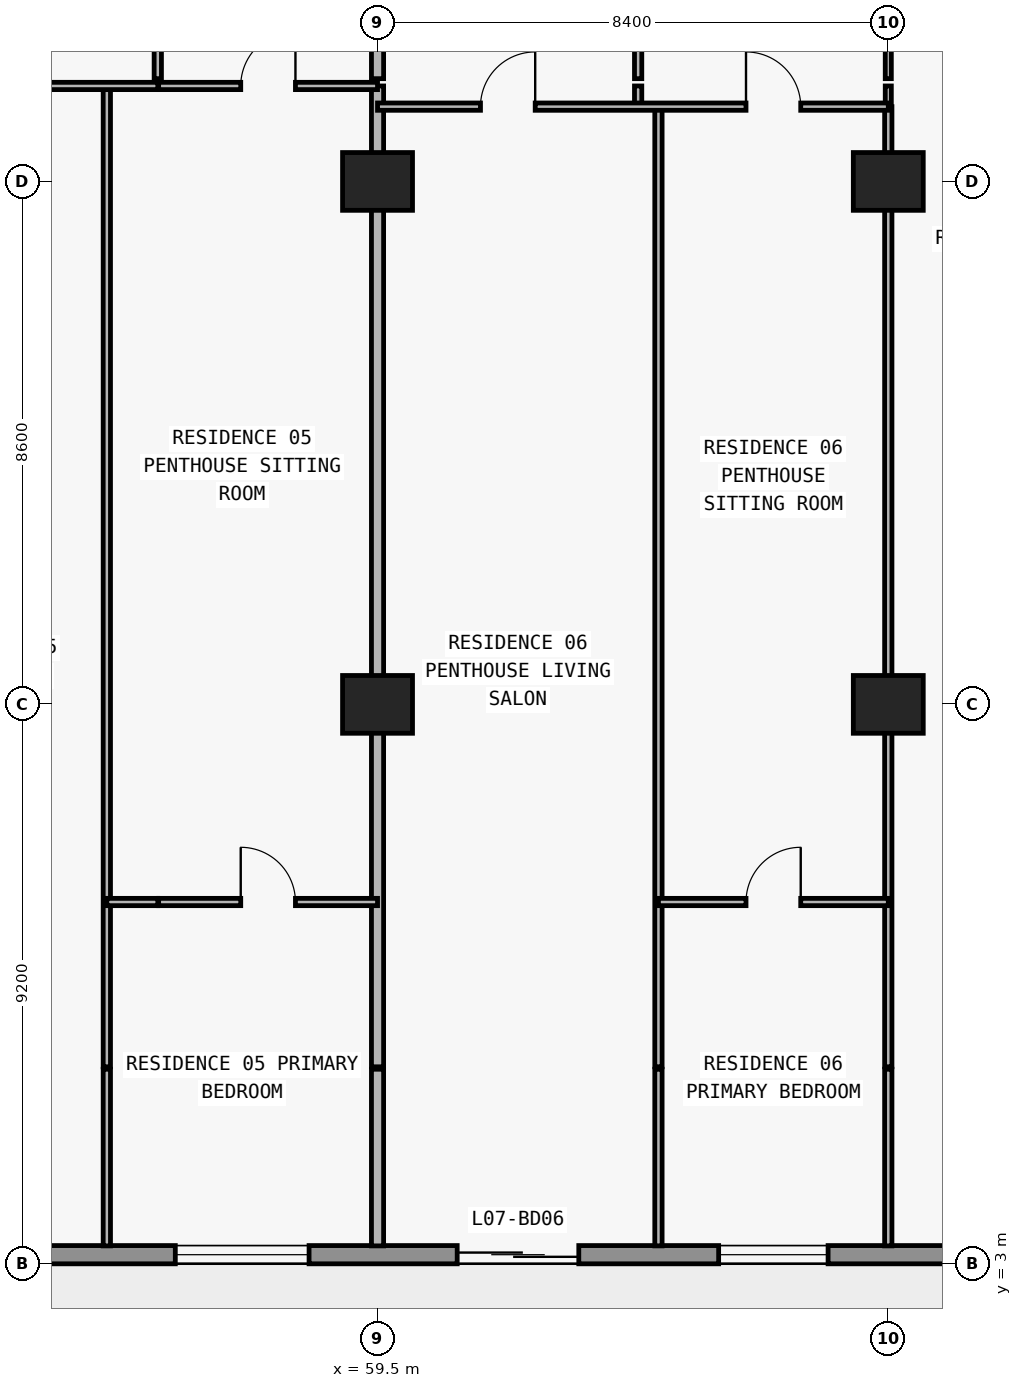
"""IFC4 building model, lengths in metres.
Left out: names, types, materials, properties, quantities, classifications, styles, units other than length and angle.
Written with IfcOpenShell. Run it as: python <this file> out.ifc"""

import sys

from ifc_helpers import new_model, si_unit, direction, frame, frame_2d, origin, origin_2d, place, context, subcontext, project, spatial, rectangle, extrude, element, fill, save


model = new_model("IFC4")
c1 = context("Model", 3, precision=1e-05, world=origin(), true_north=direction((0.0, 1.0)))
c2 = subcontext(c1, "Body", "Model", "MODEL_VIEW")
j1 = project(units=[si_unit("LENGTHUNIT", "METRE"), si_unit("PLANEANGLEUNIT", "RADIAN")], contexts=[c1])
p1 = place(None, origin())
s1 = spatial("IfcSite", under=j1, at=p1, CompositionType="ELEMENT")
p2 = place(p1, origin())
s2 = spatial("IfcBuilding", under=s1, at=p2, CompositionType="ELEMENT")
p3 = place(p2, frame((0.0, 0.0, 33.3)))
s3 = spatial("IfcBuildingStorey", under=s2, at=p3, CompositionType="ELEMENT", Elevation=33.3)
for number, where, z_axis, x_axis in (
    (1, (59.5, 12.2, 0.0), (0.0, 0.0, 1.0), (1.0, 0.0, 0.0)),
    (2, (67.9, 12.2, 0.0), (0.0, 0.0, 1.0), (1.0, 0.0, 0.0)),
    (3, (59.5, 20.8, 0.0), (0.0, 0.0, 1.0), (1.0, 0.0, 0.0)),
    (4, (67.9, 20.8, 0.0), (0.0, 0.0, 1.0), (1.0, 0.0, 0.0)),
):
    element("IfcColumn", number, at=place(p3, frame(where, z_axis=z_axis, x_axis=x_axis)), inside=s3, PredefinedType="COLUMN", context=c2, shape_type="SweptSolid", body=[
        extrude(rectangle(XDim=1.15, YDim=0.95, at=origin_2d()), origin(), (0.0, 0.0, 1.0), 3.05),
    ])
p4 = place(p3, frame((72.7, 3.15, 0.0), z_axis=(0.0, 0.0, 1.0), x_axis=(-1.0, 0.0, 0.0)))
e5 = element("IfcWall", 5, at=p4, inside=s3, PredefinedType="STANDARD", context=c2, shape_type="SweptSolid", body=[
    extrude(rectangle(XDim=67.6, YDim=0.3, at=frame_2d((33.8, 0.0))), origin(), (0.0, 0.0, 1.0), 3.05),
])
p5 = place(p4, frame((59.826, 0.0, 0.0)))
e6 = element("IfcOpeningElement", 6, at=p5, cuts=e5, PredefinedType="OPENING", context=c2, shape_type="SweptSolid", body=[
    extrude(rectangle(XDim=2.0, YDim=2.3, at=frame_2d((1.0, 1.15))), frame((0.0, 0.16, 0.0), z_axis=(0.0, -1.0, 0.0), x_axis=(1.0, 0.0, 0.0)), (0.0, 0.0, 1.0), 0.32),
])
p6 = place(p4, frame((55.526, 0.0, 0.85)))
e7 = element("IfcOpeningElement", 7, at=p6, cuts=e5, PredefinedType="OPENING", context=c2, shape_type="SweptSolid", body=[
    extrude(rectangle(XDim=2.2, YDim=1.55, at=frame_2d((1.1, 0.775))), frame((0.0, 0.16, 0.0), z_axis=(0.0, -1.0, 0.0), x_axis=(1.0, 0.0, 0.0)), (0.0, 0.0, 1.0), 0.32),
])
p7 = place(p4, frame((51.09, 0.0, 0.0)))
e8 = element("IfcOpeningElement", 8, at=p7, cuts=e5, PredefinedType="OPENING", context=c2, shape_type="SweptSolid", body=[
    extrude(rectangle(XDim=2.0, YDim=2.3, at=frame_2d((1.0, 1.15))), frame((0.0, 0.16, 0.0), z_axis=(0.0, -1.0, 0.0), x_axis=(1.0, 0.0, 0.0)), (0.0, 0.0, 1.0), 0.32),
])
p8 = place(p4, frame((46.99, 0.0, 0.85)))
e9 = element("IfcOpeningElement", 9, at=p8, cuts=e5, PredefinedType="OPENING", context=c2, shape_type="SweptSolid", body=[
    extrude(rectangle(XDim=1.8, YDim=1.55, at=frame_2d((0.9, 0.775))), frame((0.0, 0.16, 0.0), z_axis=(0.0, -1.0, 0.0), x_axis=(1.0, 0.0, 0.0)), (0.0, 0.0, 1.0), 0.32),
])
p9 = place(p4, frame((43.026, 0.0, 0.0)))
e10 = element("IfcOpeningElement", 10, at=p9, cuts=e5, PredefinedType="OPENING", context=c2, shape_type="SweptSolid", body=[
    extrude(rectangle(XDim=2.0, YDim=2.3, at=frame_2d((1.0, 1.15))), frame((0.0, 0.16, 0.0), z_axis=(0.0, -1.0, 0.0), x_axis=(1.0, 0.0, 0.0)), (0.0, 0.0, 1.0), 0.32),
])
p10 = place(p4, frame((38.726, 0.0, 0.85)))
e11 = element("IfcOpeningElement", 11, at=p10, cuts=e5, PredefinedType="OPENING", context=c2, shape_type="SweptSolid", body=[
    extrude(rectangle(XDim=2.2, YDim=1.55, at=frame_2d((1.1, 0.775))), frame((0.0, 0.16, 0.0), z_axis=(0.0, -1.0, 0.0), x_axis=(1.0, 0.0, 0.0)), (0.0, 0.0, 1.0), 0.32),
])
p11 = place(p4, frame((34.69, 0.0, 0.0)))
e12 = element("IfcOpeningElement", 12, at=p11, cuts=e5, PredefinedType="OPENING", context=c2, shape_type="SweptSolid", body=[
    extrude(rectangle(XDim=2.0, YDim=2.3, at=frame_2d((1.0, 1.15))), frame((0.0, 0.16, 0.0), z_axis=(0.0, -1.0, 0.0), x_axis=(1.0, 0.0, 0.0)), (0.0, 0.0, 1.0), 0.32),
])
p12 = place(p4, frame((30.81, 0.0, 0.65)))
e13 = element("IfcOpeningElement", 13, at=p12, cuts=e5, PredefinedType="OPENING", context=c2, shape_type="SweptSolid", body=[
    extrude(rectangle(XDim=2.6, YDim=1.85, at=frame_2d((1.3, 0.925))), frame((0.0, 0.16, 0.0), z_axis=(0.0, -1.0, 0.0), x_axis=(1.0, 0.0, 0.0)), (0.0, 0.0, 1.0), 0.32),
])
p13 = place(p4, frame((24.7, 0.0, 0.85)))
e14 = element("IfcOpeningElement", 14, at=p13, cuts=e5, PredefinedType="OPENING", context=c2, shape_type="SweptSolid", body=[
    extrude(rectangle(XDim=2.2, YDim=1.55, at=frame_2d((1.1, 0.775))), frame((0.0, 0.16, 0.0), z_axis=(0.0, -1.0, 0.0), x_axis=(1.0, 0.0, 0.0)), (0.0, 0.0, 1.0), 0.32),
])
p14 = place(p4, frame((18.626, 0.0, 0.0)))
e15 = element("IfcOpeningElement", 15, at=p14, cuts=e5, PredefinedType="OPENING", context=c2, shape_type="SweptSolid", body=[
    extrude(rectangle(XDim=2.0, YDim=2.3, at=frame_2d((1.0, 1.15))), frame((0.0, 0.16, 0.0), z_axis=(0.0, -1.0, 0.0), x_axis=(1.0, 0.0, 0.0)), (0.0, 0.0, 1.0), 0.32),
])
p15 = place(p4, frame((14.326, 0.0, 0.85)))
e16 = element("IfcOpeningElement", 16, at=p15, cuts=e5, PredefinedType="OPENING", context=c2, shape_type="SweptSolid", body=[
    extrude(rectangle(XDim=2.2, YDim=1.55, at=frame_2d((1.1, 0.775))), frame((0.0, 0.16, 0.0), z_axis=(0.0, -1.0, 0.0), x_axis=(1.0, 0.0, 0.0)), (0.0, 0.0, 1.0), 0.32),
])
p16 = place(p4, frame((9.89, 0.0, 0.0)))
e17 = element("IfcOpeningElement", 17, at=p16, cuts=e5, PredefinedType="OPENING", context=c2, shape_type="SweptSolid", body=[
    extrude(rectangle(XDim=2.0, YDim=2.3, at=frame_2d((1.0, 1.15))), frame((0.0, 0.16, 0.0), z_axis=(0.0, -1.0, 0.0), x_axis=(1.0, 0.0, 0.0)), (0.0, 0.0, 1.0), 0.32),
])
p17 = place(p4, frame((5.79, 0.0, 0.85)))
e18 = element("IfcOpeningElement", 18, at=p17, cuts=e5, PredefinedType="OPENING", context=c2, shape_type="SweptSolid", body=[
    extrude(rectangle(XDim=1.8, YDim=1.55, at=frame_2d((0.9, 0.775))), frame((0.0, 0.16, 0.0), z_axis=(0.0, -1.0, 0.0), x_axis=(1.0, 0.0, 0.0)), (0.0, 0.0, 1.0), 0.32),
])
p18 = place(p3, frame((55.048, 3.295, 0.0), z_axis=(0.0, 0.0, 1.0), x_axis=(0.0, 1.0, 0.0)))
e19 = element("IfcWall", 19, at=p18, inside=s3, PredefinedType="PARTITIONING", context=c2, shape_type="SweptSolid", body=[
    extrude(rectangle(XDim=2.905, YDim=0.12, at=frame_2d((1.453, 0.0))), origin(), (0.0, 0.0, 1.0), 3.05),
])
p19 = place(p3, frame((55.048, 6.24, 0.0), z_axis=(0.0, 0.0, 1.0), x_axis=(0.0, 1.0, 0.0)))
e20 = element("IfcWall", 20, at=p19, inside=s3, PredefinedType="PARTITIONING", context=c2, shape_type="SweptSolid", body=[
    extrude(rectangle(XDim=16.13, YDim=0.12, at=frame_2d((8.065, 0.0))), origin(), (0.0, 0.0, 1.0), 3.05),
])
p20 = place(p3, frame((55.886, 22.49, 0.0), z_axis=(0.0, 0.0, 1.0), x_axis=(0.0, 1.0, 0.0)))
e21 = element("IfcWall", 21, at=p20, inside=s3, PredefinedType="PARTITIONING", context=c2, shape_type="SweptSolid", body=[
    extrude(rectangle(XDim=4.69, YDim=0.12, at=frame_2d((2.345, 0.0))), origin(), (0.0, 0.0, 1.0), 3.05),
])
p21 = place(p20, frame((1.895, 0.0, 0.0)))
e22 = element("IfcOpeningElement", 22, at=p21, cuts=e21, PredefinedType="OPENING", context=c2, shape_type="SweptSolid", body=[
    extrude(rectangle(XDim=0.9, YDim=2.15, at=frame_2d((0.45, 1.075))), frame((0.0, 0.07, 0.0), z_axis=(0.0, -1.0, 0.0), x_axis=(1.0, 0.0, 0.0)), (0.0, 0.0, 1.0), 0.14),
])
p22 = place(p3, frame((59.5, 3.295, 0.0), z_axis=(0.0, 0.0, 1.0), x_axis=(0.0, 1.0, 0.0)))
e23 = element("IfcWall", 23, at=p22, inside=s3, PredefinedType="PARTITIONING", context=c2, shape_type="SweptSolid", body=[
    extrude(rectangle(XDim=2.905, YDim=0.2, at=frame_2d((1.453, 0.0))), origin(), (0.0, 0.0, 1.0), 3.05),
])
p23 = place(p3, frame((59.5, 6.24, 0.0), z_axis=(0.0, 0.0, 1.0), x_axis=(0.0, 1.0, 0.0)))
e24 = element("IfcWall", 24, at=p23, inside=s3, PredefinedType="PARTITIONING", context=c2, shape_type="SweptSolid", body=[
    extrude(rectangle(XDim=16.13, YDim=0.2, at=frame_2d((8.065, 0.0))), origin(), (0.0, 0.0, 1.0), 2.11),
])
p24 = place(p3, frame((59.5, 22.49, 0.0), z_axis=(0.0, 0.0, 1.0), x_axis=(0.0, 1.0, 0.0)))
e25 = element("IfcWall", 25, at=p24, inside=s3, PredefinedType="PARTITIONING", context=c2, shape_type="SweptSolid", body=[
    extrude(rectangle(XDim=4.69, YDim=0.2, at=frame_2d((2.345, 0.0))), origin(), (0.0, 0.0, 1.0), 2.11),
])
p25 = place(p3, frame((63.786, 22.03, 0.0), z_axis=(0.0, 0.0, 1.0), x_axis=(0.0, 1.0, 0.0)))
e26 = element("IfcWall", 26, at=p25, inside=s3, PredefinedType="PARTITIONING", context=c2, shape_type="SweptSolid", body=[
    extrude(rectangle(XDim=0.34, YDim=0.12, at=frame_2d((0.17, 0.0))), origin(), (0.0, 0.0, 1.0), 3.05),
])
p26 = place(p3, frame((63.786, 22.49, 0.0), z_axis=(0.0, 0.0, 1.0), x_axis=(0.0, 1.0, 0.0)))
e27 = element("IfcWall", 27, at=p26, inside=s3, PredefinedType="PARTITIONING", context=c2, shape_type="SweptSolid", body=[
    extrude(rectangle(XDim=4.69, YDim=0.12, at=frame_2d((2.345, 0.0))), origin(), (0.0, 0.0, 1.0), 3.05),
])
p27 = place(p26, frame((1.895, 0.0, 0.0)))
e28 = element("IfcOpeningElement", 28, at=p27, cuts=e27, PredefinedType="OPENING", context=c2, shape_type="SweptSolid", body=[
    extrude(rectangle(XDim=0.9, YDim=2.15, at=frame_2d((0.45, 1.075))), frame((0.0, 0.07, 0.0), z_axis=(0.0, -1.0, 0.0), x_axis=(1.0, 0.0, 0.0)), (0.0, 0.0, 1.0), 0.14),
])
p28 = place(p3, frame((64.12, 3.295, 0.0), z_axis=(0.0, 0.0, 1.0), x_axis=(0.0, 1.0, 0.0)))
e29 = element("IfcWall", 29, at=p28, inside=s3, PredefinedType="PARTITIONING", context=c2, shape_type="SweptSolid", body=[
    extrude(rectangle(XDim=2.905, YDim=0.12, at=frame_2d((1.453, 0.0))), origin(), (0.0, 0.0, 1.0), 3.05),
])
p29 = place(p3, frame((64.12, 6.24, 0.0), z_axis=(0.0, 0.0, 1.0), x_axis=(0.0, 1.0, 0.0)))
e30 = element("IfcWall", 30, at=p29, inside=s3, PredefinedType="PARTITIONING", context=c2, shape_type="SweptSolid", body=[
    extrude(rectangle(XDim=15.79, YDim=0.12, at=frame_2d((7.895, 0.0))), origin(), (0.0, 0.0, 1.0), 3.05),
])
p30 = place(p3, frame((67.9, 3.295, 0.0), z_axis=(0.0, 0.0, 1.0), x_axis=(0.0, 1.0, 0.0)))
e31 = element("IfcWall", 31, at=p30, inside=s3, PredefinedType="PARTITIONING", context=c2, shape_type="SweptSolid", body=[
    extrude(rectangle(XDim=2.905, YDim=0.12, at=frame_2d((1.453, 0.0))), origin(), (0.0, 0.0, 1.0), 3.05),
])
p31 = place(p3, frame((67.9, 6.24, 0.0), z_axis=(0.0, 0.0, 1.0), x_axis=(0.0, 1.0, 0.0)))
e32 = element("IfcWall", 32, at=p31, inside=s3, PredefinedType="PARTITIONING", context=c2, shape_type="SweptSolid", body=[
    extrude(rectangle(XDim=15.79, YDim=0.12, at=frame_2d((7.895, 0.0))), origin(), (0.0, 0.0, 1.0), 2.11),
])
p32 = place(p3, frame((67.9, 22.035, 0.0), z_axis=(0.0, 0.0, 1.0), x_axis=(0.0, 1.0, 0.0)))
e33 = element("IfcWall", 33, at=p32, inside=s3, PredefinedType="MOVABLE", context=c2, shape_type="SweptSolid", body=[
    extrude(rectangle(XDim=0.335, YDim=0.1, at=frame_2d((0.167, 0.0))), origin(), (0.0, 0.0, 1.0), 2.11),
])
p33 = place(p3, frame((67.9, 22.49, 0.0), z_axis=(0.0, 0.0, 1.0), x_axis=(0.0, 1.0, 0.0)))
e34 = element("IfcWall", 34, at=p33, inside=s3, PredefinedType="MOVABLE", context=c2, shape_type="SweptSolid", body=[
    extrude(rectangle(XDim=4.69, YDim=0.1, at=frame_2d((2.345, 0.0))), origin(), (0.0, 0.0, 1.0), 2.11),
])
p34 = place(p33, frame((1.895, 0.0, 0.0)))
e35 = element("IfcOpeningElement", 35, at=p34, cuts=e34, PredefinedType="OPENING", context=c2, shape_type="SweptSolid", body=[
    extrude(rectangle(XDim=0.9, YDim=2.06, at=frame_2d((0.45, 1.03))), frame((0.0, 0.06, 0.0), z_axis=(0.0, -1.0, 0.0), x_axis=(1.0, 0.0, 0.0)), (0.0, 0.0, 1.0), 0.12),
])
p35 = place(p3, frame((55.048, 8.95, 0.0), z_axis=(0.0, 0.0, 1.0), x_axis=(1.0, 0.0, 0.0)))
e36 = element("IfcWall", 36, at=p35, inside=s3, PredefinedType="PARTITIONING", context=c2, shape_type="SweptSolid", body=[
    extrude(rectangle(XDim=0.838, YDim=0.12, at=frame_2d((0.419, 0.0))), origin(), (0.0, 0.0, 1.0), 3.05),
])
p36 = place(p3, frame((55.9, 8.95, 0.0), z_axis=(0.0, 0.0, 1.0), x_axis=(1.0, 0.0, 0.0)))
e37 = element("IfcWall", 37, at=p36, inside=s3, PredefinedType="PARTITIONING", context=c2, shape_type="SweptSolid", body=[
    extrude(rectangle(XDim=3.6, YDim=0.12, at=frame_2d((1.8, 0.0))), origin(), (0.0, 0.0, 1.0), 3.05),
])
p37 = place(p36, frame((1.35, 0.0, 0.0)))
e38 = element("IfcOpeningElement", 38, at=p37, cuts=e37, PredefinedType="OPENING", context=c2, shape_type="SweptSolid", body=[
    extrude(rectangle(XDim=0.9, YDim=2.15, at=frame_2d((0.45, 1.075))), frame((0.0, 0.07, 0.0), z_axis=(0.0, -1.0, 0.0), x_axis=(1.0, 0.0, 0.0)), (0.0, 0.0, 1.0), 0.14),
])
p38 = place(p3, frame((64.12, 8.95, 0.0), z_axis=(0.0, 0.0, 1.0), x_axis=(1.0, 0.0, 0.0)))
e39 = element("IfcWall", 39, at=p38, inside=s3, PredefinedType="PARTITIONING", context=c2, shape_type="SweptSolid", body=[
    extrude(rectangle(XDim=3.78, YDim=0.12, at=frame_2d((1.89, 0.0))), origin(), (0.0, 0.0, 1.0), 3.05),
])
p39 = place(p38, frame((1.44, 0.0, 0.0)))
e40 = element("IfcOpeningElement", 40, at=p39, cuts=e39, PredefinedType="OPENING", context=c2, shape_type="SweptSolid", body=[
    extrude(rectangle(XDim=0.9, YDim=2.15, at=frame_2d((0.45, 1.075))), frame((0.0, 0.07, 0.0), z_axis=(0.0, -1.0, 0.0), x_axis=(1.0, 0.0, 0.0)), (0.0, 0.0, 1.0), 0.14),
])
p40 = place(p3, frame((59.5, 22.03, 0.0), z_axis=(0.0, 0.0, 1.0), x_axis=(1.0, 0.0, 0.0)))
e41 = element("IfcWall", 41, at=p40, inside=s3, PredefinedType="PARTITIONING", context=c2, shape_type="SweptSolid", body=[
    extrude(rectangle(XDim=8.4, YDim=0.12, at=frame_2d((4.2, 0.0))), origin(), (0.0, 0.0, 1.0), 3.05),
])
p41 = place(p40, frame((1.693, 0.0, 0.0)))
e42 = element("IfcOpeningElement", 42, at=p41, cuts=e41, PredefinedType="OPENING", context=c2, shape_type="SweptSolid", body=[
    extrude(rectangle(XDim=0.9, YDim=2.15, at=frame_2d((0.45, 1.075))), frame((0.0, 0.07, 0.0), z_axis=(0.0, -1.0, 0.0), x_axis=(1.0, 0.0, 0.0)), (0.0, 0.0, 1.0), 0.14),
])
p42 = place(p40, frame((6.06, 0.0, 0.0)))
e43 = element("IfcOpeningElement", 43, at=p42, cuts=e41, PredefinedType="OPENING", context=c2, shape_type="SweptSolid", body=[
    extrude(rectangle(XDim=0.9, YDim=2.15, at=frame_2d((0.45, 1.075))), frame((0.0, 0.07, 0.0), z_axis=(0.0, -1.0, 0.0), x_axis=(1.0, 0.0, 0.0)), (0.0, 0.0, 1.0), 0.14),
])
p43 = place(p3, frame((51.37, 22.37, 0.0), z_axis=(0.0, 0.0, 1.0), x_axis=(1.0, 0.0, 0.0)))
e44 = element("IfcWall", 44, at=p43, inside=s3, PredefinedType="PARTITIONING", context=c2, shape_type="SweptSolid", body=[
    extrude(rectangle(XDim=4.516, YDim=0.12, at=frame_2d((2.258, 0.0))), origin(), (0.0, 0.0, 1.0), 3.05),
])
p44 = place(p43, frame((1.389, 0.0, 0.0)))
e45 = element("IfcOpeningElement", 45, at=p44, cuts=e44, PredefinedType="OPENING", context=c2, shape_type="SweptSolid", body=[
    extrude(rectangle(XDim=0.9, YDim=2.15, at=frame_2d((0.45, 1.075))), frame((0.0, 0.07, 0.0), z_axis=(0.0, -1.0, 0.0), x_axis=(1.0, 0.0, 0.0)), (0.0, 0.0, 1.0), 0.14),
])
p45 = place(p3, frame((55.9, 22.37, 0.0), z_axis=(0.0, 0.0, 1.0), x_axis=(1.0, 0.0, 0.0)))
e46 = element("IfcWall", 46, at=p45, inside=s3, PredefinedType="PARTITIONING", context=c2, shape_type="SweptSolid", body=[
    extrude(rectangle(XDim=3.6, YDim=0.12, at=frame_2d((1.8, 0.0))), origin(), (0.0, 0.0, 1.0), 3.05),
])
p46 = place(p45, frame((1.35, 0.0, 0.0)))
e47 = element("IfcOpeningElement", 47, at=p46, cuts=e46, PredefinedType="OPENING", context=c2, shape_type="SweptSolid", body=[
    extrude(rectangle(XDim=0.9, YDim=2.15, at=frame_2d((0.45, 1.075))), frame((0.0, 0.07, 0.0), z_axis=(0.0, -1.0, 0.0), x_axis=(1.0, 0.0, 0.0)), (0.0, 0.0, 1.0), 0.14),
])
p47 = place(p15, origin())
e48 = element("IfcWindow", 48, at=p47, inside=s3, PartitioningType="SINGLE_PANEL", PredefinedType="WINDOW", context=c2, shape_type="SweptSolid", body=[
    extrude(rectangle(XDim=2.2, YDim=1.55, at=frame_2d((1.1, 0.775))), frame((0.0, 0.03, 0.0), z_axis=(0.0, -1.0, 0.0), x_axis=(1.0, 0.0, 0.0)), (0.0, 0.0, 1.0), 0.06),
])
fill(e16, e48)
p48 = place(p16, origin())
e49 = element("IfcDoor", 49, at=p48, inside=s3, OperationType="DOUBLE_DOOR_SLIDING", PredefinedType="DOOR", context=c2, shape_type="SweptSolid", body=[
    extrude(rectangle(XDim=2.0, YDim=2.3, at=frame_2d((1.0, 1.15))), frame((0.0, 0.025, 0.0), z_axis=(0.0, -1.0, 0.0), x_axis=(1.0, 0.0, 0.0)), (0.0, 0.0, 1.0), 0.05),
])
fill(e17, e49)
p49 = place(p17, origin())
e50 = element("IfcWindow", 50, at=p49, inside=s3, PartitioningType="SINGLE_PANEL", PredefinedType="WINDOW", context=c2, shape_type="SweptSolid", body=[
    extrude(rectangle(XDim=1.8, YDim=1.55, at=frame_2d((0.9, 0.775))), frame((0.0, 0.03, 0.0), z_axis=(0.0, -1.0, 0.0), x_axis=(1.0, 0.0, 0.0)), (0.0, 0.0, 1.0), 0.06),
])
fill(e18, e50)
p50 = place(p46, origin())
e51 = element("IfcDoor", 51, at=p50, inside=s3, OperationType="SINGLE_SWING_RIGHT", PredefinedType="DOOR", context=c2, shape_type="SweptSolid", body=[
    extrude(rectangle(XDim=0.9, YDim=2.15, at=frame_2d((0.45, 1.075))), frame((0.0, 0.025, 0.0), z_axis=(0.0, -1.0, 0.0), x_axis=(1.0, 0.0, 0.0)), (0.0, 0.0, 1.0), 0.05),
])
fill(e47, e51)
p51 = place(p37, origin())
e52 = element("IfcDoor", 52, at=p51, inside=s3, OperationType="SINGLE_SWING_LEFT", PredefinedType="DOOR", context=c2, shape_type="SweptSolid", body=[
    extrude(rectangle(XDim=0.9, YDim=2.15, at=frame_2d((0.45, 1.075))), frame((0.0, 0.025, 0.0), z_axis=(0.0, -1.0, 0.0), x_axis=(1.0, 0.0, 0.0)), (0.0, 0.0, 1.0), 0.05),
])
fill(e38, e52)
p52 = place(p41, origin())
e53 = element("IfcDoor", 53, at=p52, inside=s3, OperationType="SINGLE_SWING_RIGHT", PredefinedType="DOOR", context=c2, shape_type="SweptSolid", body=[
    extrude(rectangle(XDim=0.9, YDim=2.15, at=frame_2d((0.45, 1.075))), frame((0.0, 0.025, 0.0), z_axis=(0.0, -1.0, 0.0), x_axis=(1.0, 0.0, 0.0)), (0.0, 0.0, 1.0), 0.05),
])
fill(e42, e53)
p53 = place(p42, origin())
e54 = element("IfcDoor", 54, at=p53, inside=s3, OperationType="SINGLE_SWING_LEFT", PredefinedType="DOOR", context=c2, shape_type="SweptSolid", body=[
    extrude(rectangle(XDim=0.9, YDim=2.15, at=frame_2d((0.45, 1.075))), frame((0.0, 0.025, 0.0), z_axis=(0.0, -1.0, 0.0), x_axis=(1.0, 0.0, 0.0)), (0.0, 0.0, 1.0), 0.05),
])
fill(e43, e54)
p54 = place(p39, origin())
e55 = element("IfcDoor", 55, at=p54, inside=s3, OperationType="SINGLE_SWING_RIGHT", PredefinedType="DOOR", context=c2, shape_type="SweptSolid", body=[
    extrude(rectangle(XDim=0.9, YDim=2.15, at=frame_2d((0.45, 1.075))), frame((0.0, 0.025, 0.0), z_axis=(0.0, -1.0, 0.0), x_axis=(1.0, 0.0, 0.0)), (0.0, 0.0, 1.0), 0.05),
])
fill(e40, e55)
save(model, sys.argv[1])
